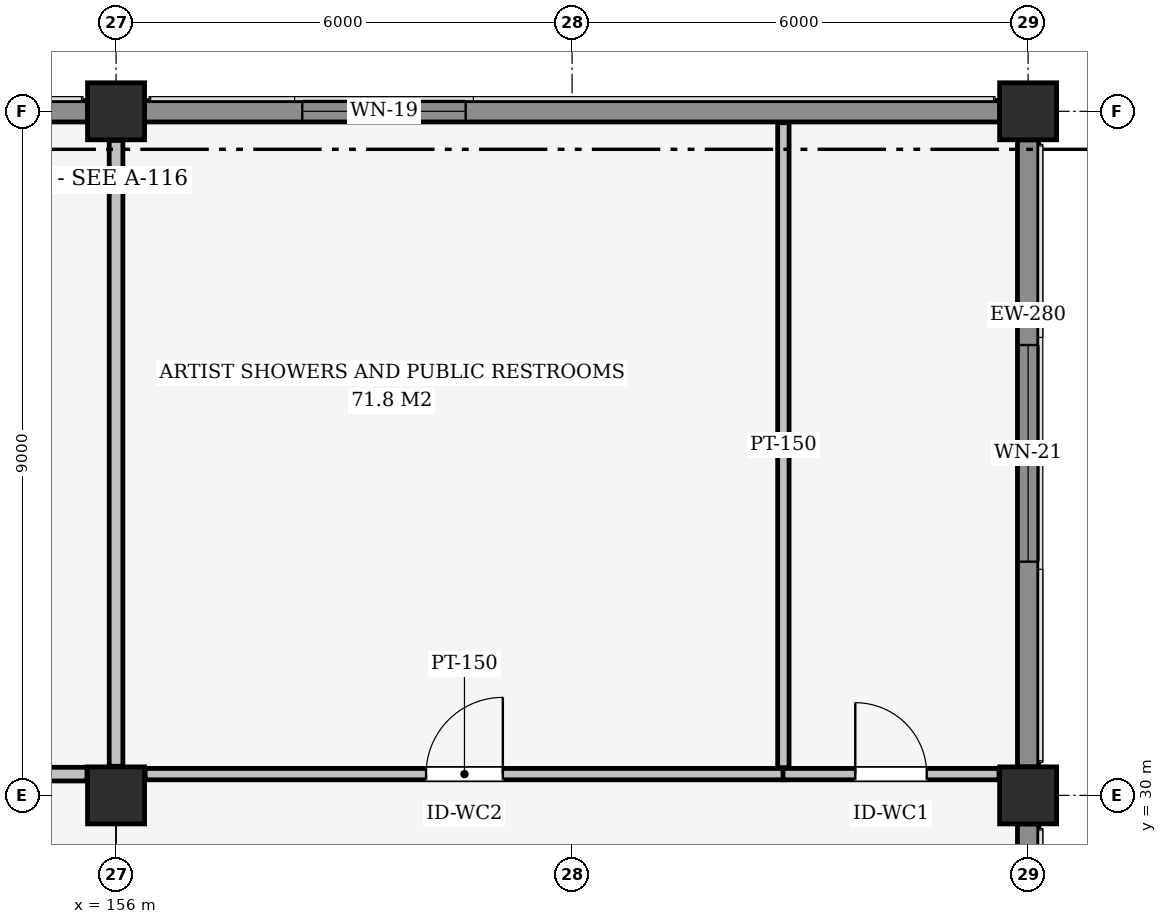
"""IFC4 building model, lengths in metres.
Left out: names, types, materials, properties, quantities, classifications, styles, units other than length and angle.
Written with IfcOpenShell. Run it as: python <this file> out.ifc"""

import sys

from ifc_helpers import new_model, si_unit, direction, frame, frame_2d, origin, origin_2d, place, context, subcontext, project, spatial, rectangle, extrude, element, fill, save


model = new_model("IFC4")
c1 = context("Model", 3, precision=1e-05, world=origin(), true_north=direction((0.0, 1.0)))
c2 = subcontext(c1, "Body", "Model", "MODEL_VIEW")
j1 = project(units=[si_unit("LENGTHUNIT", "METRE"), si_unit("PLANEANGLEUNIT", "RADIAN")], contexts=[c1])
p1 = place(None, origin())
s1 = spatial("IfcSite", under=j1, at=p1, CompositionType="ELEMENT")
p2 = place(p1, origin())
s2 = spatial("IfcBuilding", under=s1, at=p2, CompositionType="ELEMENT")
p3 = place(p2, origin())
s3 = spatial("IfcBuildingStorey", under=s2, at=p3, CompositionType="ELEMENT", Elevation=0.0)
for number, where, z_axis, x_axis in (
    (1, (156.0, 30.0, 0.0), (0.0, 0.0, 1.0), (1.0, 0.0, 0.0)),
    (2, (156.0, 39.0, 0.0), (0.0, 0.0, 1.0), (1.0, 0.0, 0.0)),
    (3, (168.0, 30.0, 0.0), (0.0, 0.0, 1.0), (1.0, 0.0, 0.0)),
    (4, (168.0, 39.0, 0.0), (0.0, 0.0, 1.0), (1.0, 0.0, 0.0)),
):
    element("IfcColumn", number, at=place(p3, frame(where, z_axis=z_axis, x_axis=x_axis)), inside=s3, PredefinedType="COLUMN", context=c2, shape_type="SweptSolid", body=[
        extrude(rectangle(XDim=0.75, YDim=0.75, at=origin_2d()), origin(), (0.0, 0.0, 1.0), 4.8),
    ])
p4 = place(p3, frame((144.375, 39.0, 0.0), z_axis=(0.0, 0.0, 1.0), x_axis=(1.0, 0.0, 0.0)))
e5 = element("IfcWall", 5, at=p4, inside=s3, PredefinedType="SOLIDWALL", context=c2, shape_type="SweptSolid", body=[
    extrude(rectangle(XDim=11.25, YDim=0.28, at=frame_2d((5.625, 0.0))), origin(), (0.0, 0.0, 1.0), 3.767),
])
p5 = place(p4, frame((4.475, 0.0, 0.85)))
e6 = element("IfcOpeningElement", 6, at=p5, cuts=e5, PredefinedType="OPENING", context=c2, shape_type="SweptSolid", body=[
    extrude(rectangle(XDim=2.3, YDim=1.6, at=frame_2d((1.15, 0.8))), frame((0.0, 0.15, 0.0), z_axis=(0.0, -1.0, 0.0), x_axis=(1.0, 0.0, 0.0)), (0.0, 0.0, 1.0), 0.3),
])
p6 = place(p3, frame((156.375, 39.0, 0.0), z_axis=(0.0, 0.0, 1.0), x_axis=(1.0, 0.0, 0.0)))
e7 = element("IfcWall", 7, at=p6, inside=s3, PredefinedType="SOLIDWALL", context=c2, shape_type="SweptSolid", body=[
    extrude(rectangle(XDim=11.25, YDim=0.28, at=frame_2d((5.625, 0.0))), origin(), (0.0, 0.0, 1.0), 3.767),
])
p7 = place(p6, frame((2.075, 0.0, 0.85)))
e8 = element("IfcOpeningElement", 8, at=p7, cuts=e7, PredefinedType="OPENING", context=c2, shape_type="SweptSolid", body=[
    extrude(rectangle(XDim=2.15, YDim=1.55, at=frame_2d((1.075, 0.775))), frame((0.0, 0.15, 0.0), z_axis=(0.0, -1.0, 0.0), x_axis=(1.0, 0.0, 0.0)), (0.0, 0.0, 1.0), 0.3),
])
p8 = place(p3, frame((168.0, 29.625, 0.0), z_axis=(0.0, 0.0, 1.0), x_axis=(0.0, -1.0, 0.0)))
e9 = element("IfcWall", 9, at=p8, inside=s3, PredefinedType="SOLIDWALL", context=c2, shape_type="SweptSolid", body=[
    extrude(rectangle(XDim=5.25, YDim=0.28, at=frame_2d((2.625, 0.0))), origin(), (0.0, 0.0, 1.0), 3.848),
])
p9 = place(p8, frame((2.905, 0.0, 0.85)))
e10 = element("IfcOpeningElement", 10, at=p9, cuts=e9, PredefinedType="OPENING", context=c2, shape_type="SweptSolid", body=[
    extrude(rectangle(XDim=1.75, YDim=1.45, at=frame_2d((0.875, 0.725))), frame((0.0, 0.15, 0.0), z_axis=(0.0, -1.0, 0.0), x_axis=(1.0, 0.0, 0.0)), (0.0, 0.0, 1.0), 0.3),
])
p10 = place(p3, frame((168.0, 38.625, 0.0), z_axis=(0.0, 0.0, 1.0), x_axis=(0.0, -1.0, 0.0)))
e11 = element("IfcWall", 11, at=p10, inside=s3, PredefinedType="SOLIDWALL", context=c2, shape_type="SweptSolid", body=[
    extrude(rectangle(XDim=8.25, YDim=0.28, at=frame_2d((4.125, 0.0))), origin(), (0.0, 0.0, 1.0), 3.849),
])
p11 = place(p10, frame((2.7, 0.0, 0.6)))
e12 = element("IfcOpeningElement", 12, at=p11, cuts=e11, PredefinedType="OPENING", context=c2, shape_type="SweptSolid", body=[
    extrude(rectangle(XDim=2.85, YDim=2.0, at=frame_2d((1.425, 1.0))), frame((0.0, 0.15, 0.0), z_axis=(0.0, -1.0, 0.0), x_axis=(1.0, 0.0, 0.0)), (0.0, 0.0, 1.0), 0.3),
])
p12 = place(p3, frame((144.383, 30.28, 0.0), z_axis=(0.0, 0.0, 1.0), x_axis=(1.0, 0.0, 0.0)))
e13 = element("IfcWall", 13, at=p12, inside=s3, PredefinedType="PARTITIONING", context=c2, shape_type="SweptSolid", body=[
    extrude(rectangle(XDim=11.234, YDim=0.18, at=frame_2d((5.617, 0.0))), origin(), (0.0, 0.0, 1.0), 3.767),
])
p13 = place(p3, frame((156.383, 30.28, 0.0), z_axis=(0.0, 0.0, 1.0), x_axis=(1.0, 0.0, 0.0)))
e14 = element("IfcWall", 14, at=p13, inside=s3, PredefinedType="PARTITIONING", context=c2, shape_type="SweptSolid", body=[
    extrude(rectangle(XDim=8.402, YDim=0.15, at=frame_2d((4.201, 0.0))), origin(), (0.0, 0.0, 1.0), 3.767),
])
p14 = place(p13, frame((3.696, 0.0, 0.0)))
e15 = element("IfcOpeningElement", 15, at=p14, cuts=e14, PredefinedType="OPENING", context=c2, shape_type="SweptSolid", body=[
    extrude(rectangle(XDim=1.01, YDim=2.1, at=frame_2d((0.505, 1.05))), frame((0.0, 0.085, 0.0), z_axis=(0.0, -1.0, 0.0), x_axis=(1.0, 0.0, 0.0)), (0.0, 0.0, 1.0), 0.17),
])
p15 = place(p3, frame((164.775, 30.28, 0.0), z_axis=(0.0, 0.0, 1.0), x_axis=(1.0, 0.0, 0.0)))
e16 = element("IfcWall", 16, at=p15, inside=s3, PredefinedType="PARTITIONING", context=c2, shape_type="SweptSolid", body=[
    extrude(rectangle(XDim=2.842, YDim=0.15, at=frame_2d((1.421, 0.0))), origin(), (0.0, 0.0, 1.0), 3.767),
])
p16 = place(p15, frame((0.951, 0.0, 0.0)))
e17 = element("IfcOpeningElement", 17, at=p16, cuts=e16, PredefinedType="OPENING", context=c2, shape_type="SweptSolid", body=[
    extrude(rectangle(XDim=0.94, YDim=2.1, at=frame_2d((0.47, 1.05))), frame((0.0, 0.085, 0.0), z_axis=(0.0, -1.0, 0.0), x_axis=(1.0, 0.0, 0.0)), (0.0, 0.0, 1.0), 0.17),
])
p17 = place(p3, frame((156.0, 30.383, 0.0), z_axis=(0.0, 0.0, 1.0), x_axis=(0.0, 1.0, 0.0)))
e18 = element("IfcWall", 18, at=p17, inside=s3, PredefinedType="PARTITIONING", context=c2, shape_type="SweptSolid", body=[
    extrude(rectangle(XDim=8.234, YDim=0.18, at=frame_2d((4.117, 0.0))), origin(), (0.0, 0.0, 1.0), 3.849),
])
p18 = place(p3, frame((164.78, 30.365, 0.0), z_axis=(0.0, 0.0, 1.0), x_axis=(0.0, 1.0, 0.0)))
e19 = element("IfcWall", 19, at=p18, inside=s3, PredefinedType="PARTITIONING", context=c2, shape_type="SweptSolid", body=[
    extrude(rectangle(XDim=8.485, YDim=0.15, at=frame_2d((4.243, 0.0))), origin(), (0.0, 0.0, 1.0), 4.003),
])
p19 = place(p7, origin())
e20 = element("IfcWindow", 20, at=p19, inside=s3, PartitioningType="SINGLE_PANEL", PredefinedType="WINDOW", context=c2, shape_type="SweptSolid", body=[
    extrude(rectangle(XDim=2.15, YDim=1.55, at=frame_2d((1.075, 0.775))), frame((0.0, 0.03, 0.0), z_axis=(0.0, -1.0, 0.0), x_axis=(1.0, 0.0, 0.0)), (0.0, 0.0, 1.0), 0.06),
])
fill(e8, e20)
p20 = place(p11, origin())
e21 = element("IfcWindow", 21, at=p20, inside=s3, PartitioningType="SINGLE_PANEL", PredefinedType="WINDOW", context=c2, shape_type="SweptSolid", body=[
    extrude(rectangle(XDim=2.85, YDim=2.0, at=frame_2d((1.425, 1.0))), frame((0.0, 0.03, 0.0), z_axis=(0.0, -1.0, 0.0), x_axis=(1.0, 0.0, 0.0)), (0.0, 0.0, 1.0), 0.06),
])
fill(e12, e21)
p21 = place(p14, origin())
e22 = element("IfcDoor", 22, at=p21, inside=s3, OperationType="SINGLE_SWING_RIGHT", PredefinedType="DOOR", context=c2, shape_type="SweptSolid", body=[
    extrude(rectangle(XDim=1.01, YDim=2.1, at=frame_2d((0.505, 1.05))), frame((0.0, 0.025, 0.0), z_axis=(0.0, -1.0, 0.0), x_axis=(1.0, 0.0, 0.0)), (0.0, 0.0, 1.0), 0.05),
])
fill(e15, e22)
p22 = place(p16, origin())
e23 = element("IfcDoor", 23, at=p22, inside=s3, OperationType="SINGLE_SWING_LEFT", PredefinedType="DOOR", context=c2, shape_type="SweptSolid", body=[
    extrude(rectangle(XDim=0.94, YDim=2.1, at=frame_2d((0.47, 1.05))), frame((0.0, 0.025, 0.0), z_axis=(0.0, -1.0, 0.0), x_axis=(1.0, 0.0, 0.0)), (0.0, 0.0, 1.0), 0.05),
])
fill(e17, e23)
save(model, sys.argv[1])
